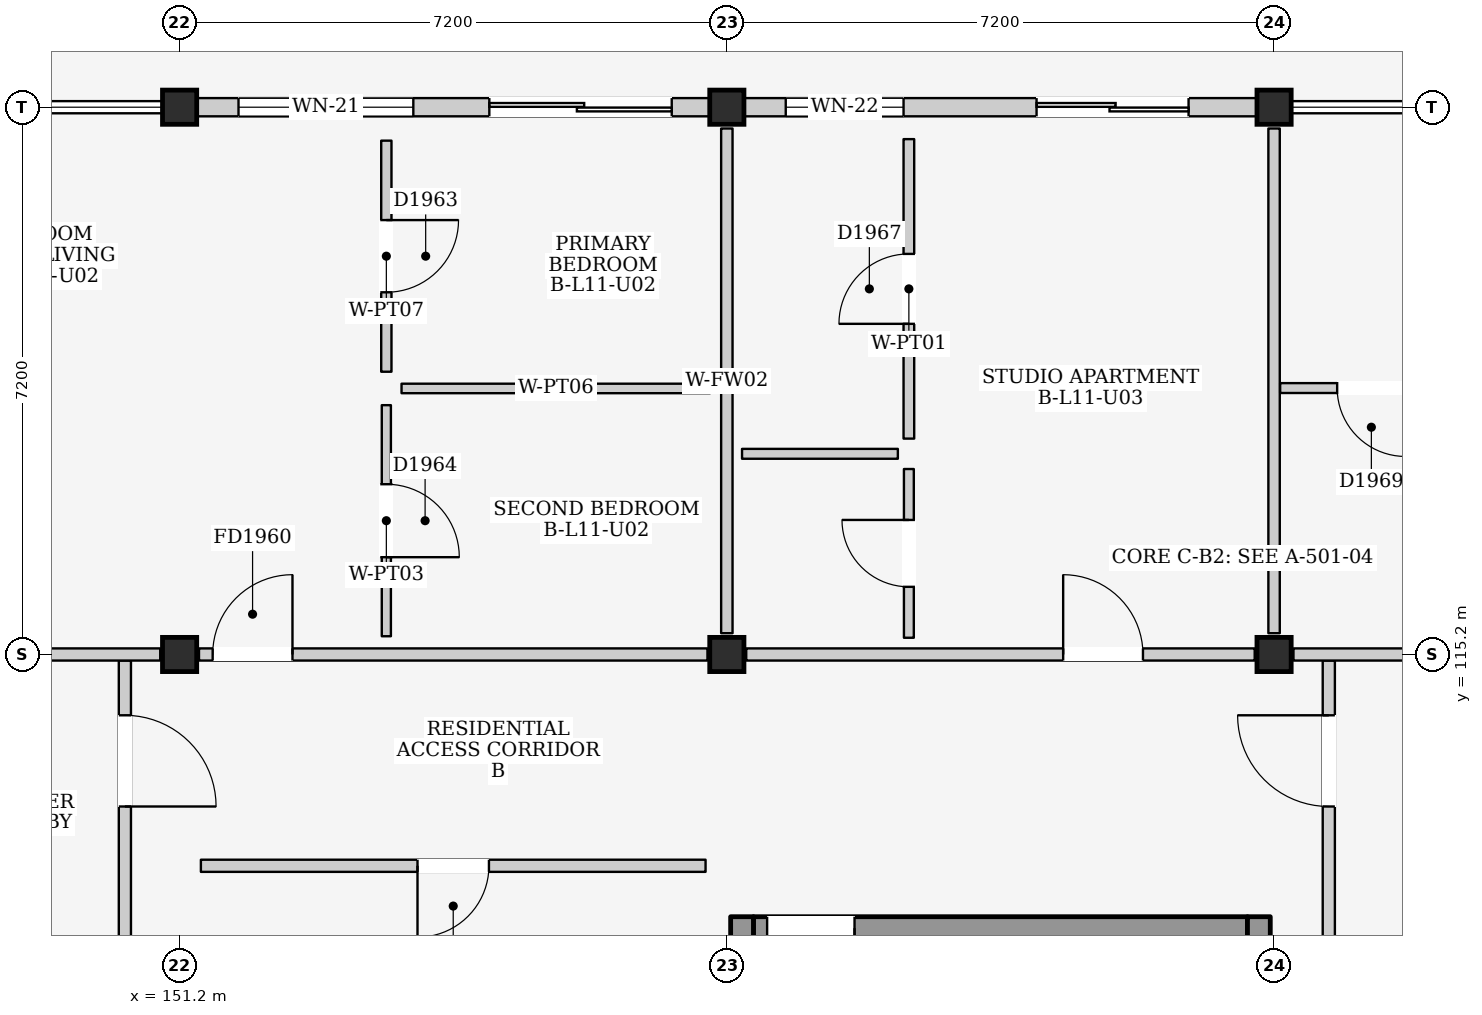
"""IFC4 building model, lengths in metres.
Left out: names, types, materials, properties, quantities, classifications, styles, units other than length and angle.
Written with IfcOpenShell. Run it as: python <this file> out.ifc"""

import sys

from ifc_helpers import new_model, si_unit, direction, frame, frame_2d, origin, origin_2d, place, context, subcontext, project, spatial, rectangle, extrude, element, fill, save


model = new_model("IFC4")
c1 = context("Model", 3, precision=1e-05, world=origin(), true_north=direction((0.0, 1.0)))
c2 = subcontext(c1, "Body", "Model", "MODEL_VIEW")
j1 = project(units=[si_unit("LENGTHUNIT", "METRE"), si_unit("PLANEANGLEUNIT", "RADIAN")], contexts=[c1])
p1 = place(None, origin())
s1 = spatial("IfcSite", under=j1, at=p1, CompositionType="ELEMENT")
p2 = place(p1, origin())
s2 = spatial("IfcBuilding", under=s1, at=p2, CompositionType="ELEMENT")
p3 = place(p2, frame((0.0, 0.0, 38.0)))
s3 = spatial("IfcBuildingStorey", under=s2, at=p3, CompositionType="ELEMENT", Elevation=38.0)
for number, where, z_axis, x_axis in (
    (1, (151.2, 115.2, 0.0), (0.0, 0.0, 1.0), (1.0, 0.0, 0.0)),
    (2, (151.2, 122.4, 0.0), (0.0, 0.0, 1.0), (1.0, 0.0, 0.0)),
    (3, (158.4, 115.2, 0.0), (0.0, 0.0, 1.0), (1.0, 0.0, 0.0)),
    (4, (158.4, 122.4, 0.0), (0.0, 0.0, 1.0), (1.0, 0.0, 0.0)),
    (5, (165.6, 115.2, 0.0), (0.0, 0.0, 1.0), (1.0, 0.0, 0.0)),
    (6, (165.6, 122.4, 0.0), (0.0, 0.0, 1.0), (1.0, 0.0, 0.0)),
):
    element("IfcColumn", number, at=place(p3, frame(where, z_axis=z_axis, x_axis=x_axis)), inside=s3, PredefinedType="COLUMN", context=c2, shape_type="SweptSolid", body=[
        extrude(rectangle(XDim=0.45, YDim=0.45, at=origin_2d()), origin(), (0.0, 0.0, 1.0), 3.2),
    ])
p4 = place(p3, frame((151.425, 122.4, 0.0), z_axis=(0.0, 0.0, 1.0), x_axis=(1.0, 0.0, 0.0)))
e7 = element("IfcWall", 7, at=p4, inside=s3, PredefinedType="ELEMENTEDWALL", context=c2, shape_type="SweptSolid", body=[
    extrude(rectangle(XDim=6.75, YDim=0.24, at=frame_2d((3.375, 0.0))), origin(), (0.0, 0.0, 1.0), 2.525),
])
p5 = place(p4, frame((3.85, 0.0, 0.0)))
e8 = element("IfcOpeningElement", 8, at=p5, cuts=e7, PredefinedType="OPENING", context=c2, shape_type="SweptSolid", body=[
    extrude(rectangle(XDim=2.4, YDim=2.12, at=frame_2d((1.2, 1.06))), frame((0.0, 0.135, 0.0), z_axis=(0.0, -1.0, 0.0), x_axis=(1.0, 0.0, 0.0)), (0.0, 0.0, 1.0), 0.27),
])
p6 = place(p4, frame((0.55, 0.0, 0.815)))
e9 = element("IfcOpeningElement", 9, at=p6, cuts=e7, PredefinedType="OPENING", context=c2, shape_type="SweptSolid", body=[
    extrude(rectangle(XDim=2.3, YDim=1.6, at=frame_2d((1.15, 0.8))), frame((0.0, 0.135, 0.0), z_axis=(0.0, -1.0, 0.0), x_axis=(1.0, 0.0, 0.0)), (0.0, 0.0, 1.0), 0.27),
])
p7 = place(p3, frame((158.625, 122.4, 0.0), z_axis=(0.0, 0.0, 1.0), x_axis=(1.0, 0.0, 0.0)))
e10 = element("IfcWall", 10, at=p7, inside=s3, PredefinedType="ELEMENTEDWALL", context=c2, shape_type="SweptSolid", body=[
    extrude(rectangle(XDim=6.75, YDim=0.24, at=frame_2d((3.375, 0.0))), origin(), (0.0, 0.0, 1.0), 2.525),
])
p8 = place(p7, frame((3.85, 0.0, 0.0)))
e11 = element("IfcOpeningElement", 11, at=p8, cuts=e10, PredefinedType="OPENING", context=c2, shape_type="SweptSolid", body=[
    extrude(rectangle(XDim=2.0, YDim=2.12, at=frame_2d((1.0, 1.06))), frame((0.0, 0.135, 0.0), z_axis=(0.0, -1.0, 0.0), x_axis=(1.0, 0.0, 0.0)), (0.0, 0.0, 1.0), 0.27),
])
p9 = place(p7, frame((0.55, 0.0, 0.9)))
e12 = element("IfcOpeningElement", 12, at=p9, cuts=e10, PredefinedType="OPENING", context=c2, shape_type="SweptSolid", body=[
    extrude(rectangle(XDim=1.55, YDim=1.45, at=frame_2d((0.775, 0.725))), frame((0.0, 0.135, 0.0), z_axis=(0.0, -1.0, 0.0), x_axis=(1.0, 0.0, 0.0)), (0.0, 0.0, 1.0), 0.27),
])
p10 = place(p3, frame((150.48, 111.1, 0.0), z_axis=(0.0, 0.0, 1.0), x_axis=(0.0, 1.0, 0.0)))
e13 = element("IfcWall", 13, at=p10, inside=s3, PredefinedType="PARTITIONING", context=c2, shape_type="SweptSolid", body=[
    extrude(rectangle(XDim=4.02, YDim=0.16, at=frame_2d((2.01, 0.0))), origin(), (0.0, 0.0, 1.0), 2.99),
])
p11 = place(p10, frame((2.1, 0.0, 0.0)))
e14 = element("IfcOpeningElement", 14, at=p11, cuts=e13, PredefinedType="OPENING", context=c2, shape_type="SweptSolid", body=[
    extrude(rectangle(XDim=1.2, YDim=2.2, at=frame_2d((0.6, 1.1))), frame((0.0, 0.095, 0.0), z_axis=(0.0, -1.0, 0.0), x_axis=(1.0, 0.0, 0.0)), (0.0, 0.0, 1.0), 0.19),
])
p12 = place(p3, frame((158.75, 111.6, 0.0), z_axis=(0.0, 0.0, 1.0), x_axis=(1.0, 0.0, 0.0)))
e15 = element("IfcWall", 15, at=p12, inside=s3, PredefinedType="SHEAR", context=c2, shape_type="SweptSolid", body=[
    extrude(rectangle(XDim=6.5, YDim=0.3, at=frame_2d((3.25, 0.0))), origin(), (0.0, 0.0, 1.0), 2.99),
])
p13 = place(p12, frame((0.18, 0.0, 0.0)))
e16 = element("IfcOpeningElement", 16, at=p13, cuts=e15, PredefinedType="OPENING", context=c2, shape_type="SweptSolid", body=[
    extrude(rectangle(XDim=1.15, YDim=2.2, at=frame_2d((0.575, 1.1))), frame((0.0, 0.165, 0.0), z_axis=(0.0, -1.0, 0.0), x_axis=(1.0, 0.0, 0.0)), (0.0, 0.0, 1.0), 0.33),
])
for number, where, z_axis, x_axis in (
    (17, (158.6, 108.15, 0.0), (0.0, 0.0, 1.0), (0.0, 1.0, 0.0)),
    (18, (165.4, 108.15, 0.0), (0.0, 0.0, 1.0), (0.0, 1.0, 0.0)),
):
    element("IfcWall", number, at=place(p3, frame(where, z_axis=z_axis, x_axis=x_axis)), inside=s3, PredefinedType="SHEAR", context=c2, shape_type="SweptSolid", body=[
        extrude(rectangle(XDim=3.6, YDim=0.3, at=frame_2d((1.8, 0.0))), origin(), (0.0, 0.0, 1.0), 2.99),
    ])
p14 = place(p3, frame((166.32, 110.8, 0.0), z_axis=(0.0, 0.0, 1.0), x_axis=(0.0, 1.0, 0.0)))
e19 = element("IfcWall", 19, at=p14, inside=s3, PredefinedType="PARTITIONING", context=c2, shape_type="SweptSolid", body=[
    extrude(rectangle(XDim=4.32, YDim=0.16, at=frame_2d((2.16, 0.0))), origin(), (0.0, 0.0, 1.0), 2.99),
])
p15 = place(p14, frame((2.4, 0.0, 0.0)))
e20 = element("IfcOpeningElement", 20, at=p15, cuts=e19, PredefinedType="OPENING", context=c2, shape_type="SweptSolid", body=[
    extrude(rectangle(XDim=1.2, YDim=2.2, at=frame_2d((0.6, 1.1))), frame((0.0, 0.095, 0.0), z_axis=(0.0, -1.0, 0.0), x_axis=(1.0, 0.0, 0.0)), (0.0, 0.0, 1.0), 0.19),
])
p16 = place(p3, frame((144.255, 115.2, 0.0), z_axis=(0.0, 0.0, 1.0), x_axis=(1.0, 0.0, 0.0)))
e21 = element("IfcWall", 21, at=p16, inside=s3, PredefinedType="PARTITIONING", context=c2, shape_type="SweptSolid", body=[
    extrude(rectangle(XDim=6.69, YDim=0.16, at=frame_2d((3.345, 0.0))), origin(), (0.0, 0.0, 1.0), 2.375),
])
p17 = place(p3, frame((151.455, 115.2, 0.0), z_axis=(0.0, 0.0, 1.0), x_axis=(1.0, 0.0, 0.0)))
e22 = element("IfcWall", 22, at=p17, inside=s3, PredefinedType="PARTITIONING", context=c2, shape_type="SweptSolid", body=[
    extrude(rectangle(XDim=6.69, YDim=0.16, at=frame_2d((3.345, 0.0))), origin(), (0.0, 0.0, 1.0), 2.375),
])
p18 = place(p17, frame((0.18, 0.0, 0.0)))
e23 = element("IfcOpeningElement", 23, at=p18, cuts=e22, PredefinedType="OPENING", context=c2, shape_type="SweptSolid", body=[
    extrude(rectangle(XDim=1.05, YDim=2.15, at=frame_2d((0.525, 1.075))), frame((0.0, 0.095, 0.0), z_axis=(0.0, -1.0, 0.0), x_axis=(1.0, 0.0, 0.0)), (0.0, 0.0, 1.0), 0.19),
])
p19 = place(p3, frame((158.4, 115.48, 0.0), z_axis=(0.0, 0.0, 1.0), x_axis=(0.0, 1.0, 0.0)))
e24 = element("IfcWall", 24, at=p19, inside=s3, PredefinedType="PARTITIONING", context=c2, shape_type="SweptSolid", body=[
    extrude(rectangle(XDim=6.64, YDim=0.15, at=frame_2d((3.32, 0.0))), origin(), (0.0, 0.0, 1.0), 2.475),
])
p20 = place(p3, frame((153.92, 118.92, 0.0), z_axis=(0.0, 0.0, 1.0), x_axis=(0.0, 1.0, 0.0)))
e25 = element("IfcWall", 25, at=p20, inside=s3, PredefinedType="PARTITIONING", context=c2, shape_type="SweptSolid", body=[
    extrude(rectangle(XDim=3.04, YDim=0.135, at=frame_2d((1.52, 0.0))), origin(), (0.0, 0.0, 1.0), 2.99),
])
p21 = place(p20, frame((1.045, 0.0, 0.0)))
e26 = element("IfcOpeningElement", 26, at=p21, cuts=e25, PredefinedType="OPENING", context=c2, shape_type="SweptSolid", body=[
    extrude(rectangle(XDim=0.95, YDim=2.15, at=frame_2d((0.475, 1.075))), frame((0.0, 0.083, 0.0), z_axis=(0.0, -1.0, 0.0), x_axis=(1.0, 0.0, 0.0)), (0.0, 0.0, 1.0), 0.165),
])
p22 = place(p3, frame((154.12, 118.7, 0.0), z_axis=(0.0, 0.0, 1.0), x_axis=(1.0, 0.0, 0.0)))
e27 = element("IfcWall", 27, at=p22, inside=s3, PredefinedType="PARTITIONING", context=c2, shape_type="SweptSolid", body=[
    extrude(rectangle(XDim=4.06, YDim=0.125, at=frame_2d((2.03, 0.0))), origin(), (0.0, 0.0, 1.0), 2.99),
])
p23 = place(p3, frame((153.92, 115.44, 0.0), z_axis=(0.0, 0.0, 1.0), x_axis=(0.0, 1.0, 0.0)))
e28 = element("IfcWall", 28, at=p23, inside=s3, PredefinedType="PARTITIONING", context=c2, shape_type="SweptSolid", body=[
    extrude(rectangle(XDim=3.04, YDim=0.12, at=frame_2d((1.52, 0.0))), origin(), (0.0, 0.0, 1.0), 2.99),
])
p24 = place(p23, frame((1.04, 0.0, 0.0)))
e29 = element("IfcOpeningElement", 29, at=p24, cuts=e28, PredefinedType="OPENING", context=c2, shape_type="SweptSolid", body=[
    extrude(rectangle(XDim=0.96, YDim=2.15, at=frame_2d((0.48, 1.075))), frame((0.0, 0.075, 0.0), z_axis=(0.0, -1.0, 0.0), x_axis=(1.0, 0.0, 0.0)), (0.0, 0.0, 1.0), 0.15),
])
p25 = place(p3, frame((158.655, 115.2, 0.0), z_axis=(0.0, 0.0, 1.0), x_axis=(1.0, 0.0, 0.0)))
e30 = element("IfcWall", 30, at=p25, inside=s3, PredefinedType="PARTITIONING", context=c2, shape_type="SweptSolid", body=[
    extrude(rectangle(XDim=6.69, YDim=0.16, at=frame_2d((3.345, 0.0))), origin(), (0.0, 0.0, 1.0), 2.375),
])
p26 = place(p25, frame((4.17, 0.0, 0.0)))
e31 = element("IfcOpeningElement", 31, at=p26, cuts=e30, PredefinedType="OPENING", context=c2, shape_type="SweptSolid", body=[
    extrude(rectangle(XDim=1.05, YDim=2.15, at=frame_2d((0.525, 1.075))), frame((0.0, 0.095, 0.0), z_axis=(0.0, -1.0, 0.0), x_axis=(1.0, 0.0, 0.0)), (0.0, 0.0, 1.0), 0.19),
])
p27 = place(p3, frame((165.6, 115.48, 0.0), z_axis=(0.0, 0.0, 1.0), x_axis=(0.0, 1.0, 0.0)))
e32 = element("IfcWall", 32, at=p27, inside=s3, PredefinedType="PARTITIONING", context=c2, shape_type="SweptSolid", body=[
    extrude(rectangle(XDim=6.64, YDim=0.15, at=frame_2d((3.32, 0.0))), origin(), (0.0, 0.0, 1.0), 2.475),
])
p28 = place(p3, frame((158.6, 117.84, 0.0), z_axis=(0.0, 0.0, 1.0), x_axis=(1.0, 0.0, 0.0)))
e33 = element("IfcWall", 33, at=p28, inside=s3, PredefinedType="PARTITIONING", context=c2, shape_type="SweptSolid", body=[
    extrude(rectangle(XDim=2.05, YDim=0.13, at=frame_2d((1.025, 0.0))), origin(), (0.0, 0.0, 1.0), 2.99),
])
p29 = place(p3, frame((160.795, 115.42, 0.0), z_axis=(0.0, 0.0, 1.0), x_axis=(0.0, 1.0, 0.0)))
e34 = element("IfcWall", 34, at=p29, inside=s3, PredefinedType="PARTITIONING", context=c2, shape_type="SweptSolid", body=[
    extrude(rectangle(XDim=2.22, YDim=0.13, at=frame_2d((1.11, 0.0))), origin(), (0.0, 0.0, 1.0), 2.99),
])
p30 = place(p29, frame((0.67, 0.0, 0.0)))
e35 = element("IfcOpeningElement", 35, at=p30, cuts=e34, PredefinedType="OPENING", context=c2, shape_type="SweptSolid", body=[
    extrude(rectangle(XDim=0.88, YDim=2.1, at=frame_2d((0.44, 1.05))), frame((0.0, 0.08, 0.0), z_axis=(0.0, -1.0, 0.0), x_axis=(1.0, 0.0, 0.0)), (0.0, 0.0, 1.0), 0.16),
])
p31 = place(p3, frame((160.795, 118.04, 0.0), z_axis=(0.0, 0.0, 1.0), x_axis=(0.0, 1.0, 0.0)))
e36 = element("IfcWall", 36, at=p31, inside=s3, PredefinedType="PARTITIONING", context=c2, shape_type="SweptSolid", body=[
    extrude(rectangle(XDim=3.94, YDim=0.14, at=frame_2d((1.97, 0.0))), origin(), (0.0, 0.0, 1.0), 2.99),
])
p32 = place(p31, frame((1.51, 0.0, 0.0)))
e37 = element("IfcOpeningElement", 37, at=p32, cuts=e36, PredefinedType="OPENING", context=c2, shape_type="SweptSolid", body=[
    extrude(rectangle(XDim=0.92, YDim=2.1, at=frame_2d((0.46, 1.05))), frame((0.0, 0.085, 0.0), z_axis=(0.0, -1.0, 0.0), x_axis=(1.0, 0.0, 0.0)), (0.0, 0.0, 1.0), 0.17),
])
p33 = place(p3, frame((165.855, 115.2, 0.0), z_axis=(0.0, 0.0, 1.0), x_axis=(1.0, 0.0, 0.0)))
e38 = element("IfcWall", 38, at=p33, inside=s3, PredefinedType="PARTITIONING", context=c2, shape_type="SweptSolid", body=[
    extrude(rectangle(XDim=6.69, YDim=0.16, at=frame_2d((3.345, 0.0))), origin(), (0.0, 0.0, 1.0), 2.375),
])
p34 = place(p3, frame((165.68, 118.705, 0.0), z_axis=(0.0, 0.0, 1.0), x_axis=(1.0, 0.0, 0.0)))
e39 = element("IfcWall", 39, at=p34, inside=s3, PredefinedType="PARTITIONING", context=c2, shape_type="SweptSolid", body=[
    extrude(rectangle(XDim=2.4, YDim=0.13, at=frame_2d((1.2, 0.0))), origin(), (0.0, 0.0, 1.0), 2.99),
])
p35 = place(p34, frame((0.75, 0.0, 0.0)))
e40 = element("IfcOpeningElement", 40, at=p35, cuts=e39, PredefinedType="OPENING", context=c2, shape_type="SweptSolid", body=[
    extrude(rectangle(XDim=0.9, YDim=2.1, at=frame_2d((0.45, 1.05))), frame((0.0, 0.08, 0.0), z_axis=(0.0, -1.0, 0.0), x_axis=(1.0, 0.0, 0.0)), (0.0, 0.0, 1.0), 0.16),
])
p36 = place(p3, frame((151.48, 112.42, 0.0), z_axis=(0.0, 0.0, 1.0), x_axis=(1.0, 0.0, 0.0)))
e41 = element("IfcWall", 41, at=p36, inside=s3, PredefinedType="PARTITIONING", context=c2, shape_type="SweptSolid", body=[
    extrude(rectangle(XDim=6.64, YDim=0.16, at=frame_2d((3.32, 0.0))), origin(), (0.0, 0.0, 1.0), 2.99),
])
p37 = place(p36, frame((2.85, 0.0, 0.0)))
e42 = element("IfcOpeningElement", 42, at=p37, cuts=e41, PredefinedType="OPENING", context=c2, shape_type="SweptSolid", body=[
    extrude(rectangle(XDim=0.94, YDim=2.12, at=frame_2d((0.47, 1.06))), frame((0.0, 0.095, 0.0), z_axis=(0.0, -1.0, 0.0), x_axis=(1.0, 0.0, 0.0)), (0.0, 0.0, 1.0), 0.19),
])
p38 = place(p5, frame((2.4, 0.0, 0.0), z_axis=(0.0, 0.0, 1.0), x_axis=(-1.0, 0.0, 0.0)))
e43 = element("IfcDoor", 43, at=p38, inside=s3, OperationType="DOUBLE_DOOR_SLIDING", PredefinedType="DOOR", context=c2, shape_type="SweptSolid", body=[
    extrude(rectangle(XDim=2.4, YDim=2.12, at=frame_2d((1.2, 1.06))), frame((0.0, 0.025, 0.0), z_axis=(0.0, -1.0, 0.0), x_axis=(1.0, 0.0, 0.0)), (0.0, 0.0, 1.0), 0.05),
])
fill(e8, e43)
p39 = place(p6, origin())
e44 = element("IfcWindow", 44, at=p39, inside=s3, PartitioningType="TRIPLE_PANEL_VERTICAL", PredefinedType="WINDOW", context=c2, shape_type="SweptSolid", body=[
    extrude(rectangle(XDim=2.3, YDim=1.6, at=frame_2d((1.15, 0.8))), frame((0.0, 0.03, 0.0), z_axis=(0.0, -1.0, 0.0), x_axis=(1.0, 0.0, 0.0)), (0.0, 0.0, 1.0), 0.06),
])
fill(e9, e44)
p40 = place(p8, frame((2.0, 0.0, 0.0), z_axis=(0.0, 0.0, 1.0), x_axis=(-1.0, 0.0, 0.0)))
e45 = element("IfcDoor", 45, at=p40, inside=s3, OperationType="DOUBLE_DOOR_SLIDING", PredefinedType="DOOR", context=c2, shape_type="SweptSolid", body=[
    extrude(rectangle(XDim=2.0, YDim=2.12, at=frame_2d((1.0, 1.06))), frame((0.0, 0.025, 0.0), z_axis=(0.0, -1.0, 0.0), x_axis=(1.0, 0.0, 0.0)), (0.0, 0.0, 1.0), 0.05),
])
fill(e11, e45)
p41 = place(p9, origin())
e46 = element("IfcWindow", 46, at=p41, inside=s3, PartitioningType="DOUBLE_PANEL_VERTICAL", PredefinedType="WINDOW", context=c2, shape_type="SweptSolid", body=[
    extrude(rectangle(XDim=1.55, YDim=1.45, at=frame_2d((0.775, 0.725))), frame((0.0, 0.03, 0.0), z_axis=(0.0, -1.0, 0.0), x_axis=(1.0, 0.0, 0.0)), (0.0, 0.0, 1.0), 0.06),
])
fill(e12, e46)
p42 = place(p11, frame((1.2, 0.0, 0.0), z_axis=(0.0, 0.0, 1.0), x_axis=(-1.0, 0.0, 0.0)))
e47 = element("IfcDoor", 47, at=p42, inside=s3, OperationType="SINGLE_SWING_RIGHT", PredefinedType="DOOR", context=c2, shape_type="SweptSolid", body=[
    extrude(rectangle(XDim=1.2, YDim=2.2, at=frame_2d((0.6, 1.1))), frame((0.0, 0.025, 0.0), z_axis=(0.0, -1.0, 0.0), x_axis=(1.0, 0.0, 0.0)), (0.0, 0.0, 1.0), 0.05),
])
fill(e14, e47)
p43 = place(p13, frame((1.15, 0.0, 0.0), z_axis=(0.0, 0.0, 1.0), x_axis=(-1.0, 0.0, 0.0)))
e48 = element("IfcDoor", 48, at=p43, inside=s3, OperationType="SINGLE_SWING_LEFT", PredefinedType="DOOR", context=c2, shape_type="SweptSolid", body=[
    extrude(rectangle(XDim=1.15, YDim=2.2, at=frame_2d((0.575, 1.1))), frame((0.0, 0.025, 0.0), z_axis=(0.0, -1.0, 0.0), x_axis=(1.0, 0.0, 0.0)), (0.0, 0.0, 1.0), 0.05),
])
fill(e16, e48)
p44 = place(p15, origin())
e49 = element("IfcDoor", 49, at=p44, inside=s3, OperationType="SINGLE_SWING_RIGHT", PredefinedType="DOOR", context=c2, shape_type="SweptSolid", body=[
    extrude(rectangle(XDim=1.2, YDim=2.2, at=frame_2d((0.6, 1.1))), frame((0.0, 0.025, 0.0), z_axis=(0.0, -1.0, 0.0), x_axis=(1.0, 0.0, 0.0)), (0.0, 0.0, 1.0), 0.05),
])
fill(e20, e49)
p45 = place(p18, origin())
e50 = element("IfcDoor", 50, at=p45, inside=s3, OperationType="SINGLE_SWING_RIGHT", PredefinedType="DOOR", context=c2, shape_type="SweptSolid", body=[
    extrude(rectangle(XDim=1.05, YDim=2.15, at=frame_2d((0.525, 1.075))), frame((0.0, 0.025, 0.0), z_axis=(0.0, -1.0, 0.0), x_axis=(1.0, 0.0, 0.0)), (0.0, 0.0, 1.0), 0.05),
])
fill(e23, e50)
p46 = place(p21, frame((0.95, 0.0, 0.0), z_axis=(0.0, 0.0, 1.0), x_axis=(-1.0, 0.0, 0.0)))
e51 = element("IfcDoor", 51, at=p46, inside=s3, OperationType="SINGLE_SWING_LEFT", PredefinedType="DOOR", context=c2, shape_type="SweptSolid", body=[
    extrude(rectangle(XDim=0.95, YDim=2.15, at=frame_2d((0.475, 1.075))), frame((0.0, 0.025, 0.0), z_axis=(0.0, -1.0, 0.0), x_axis=(1.0, 0.0, 0.0)), (0.0, 0.0, 1.0), 0.05),
])
fill(e26, e51)
p47 = place(p24, frame((0.96, 0.0, 0.0), z_axis=(0.0, 0.0, 1.0), x_axis=(-1.0, 0.0, 0.0)))
e52 = element("IfcDoor", 52, at=p47, inside=s3, OperationType="SINGLE_SWING_RIGHT", PredefinedType="DOOR", context=c2, shape_type="SweptSolid", body=[
    extrude(rectangle(XDim=0.96, YDim=2.15, at=frame_2d((0.48, 1.075))), frame((0.0, 0.025, 0.0), z_axis=(0.0, -1.0, 0.0), x_axis=(1.0, 0.0, 0.0)), (0.0, 0.0, 1.0), 0.05),
])
fill(e29, e52)
p48 = place(p26, origin())
e53 = element("IfcDoor", 53, at=p48, inside=s3, OperationType="SINGLE_SWING_LEFT", PredefinedType="DOOR", context=c2, shape_type="SweptSolid", body=[
    extrude(rectangle(XDim=1.05, YDim=2.15, at=frame_2d((0.525, 1.075))), frame((0.0, 0.025, 0.0), z_axis=(0.0, -1.0, 0.0), x_axis=(1.0, 0.0, 0.0)), (0.0, 0.0, 1.0), 0.05),
])
fill(e31, e53)
p49 = place(p30, origin())
e54 = element("IfcDoor", 54, at=p49, inside=s3, OperationType="SINGLE_SWING_RIGHT", PredefinedType="DOOR", context=c2, shape_type="SweptSolid", body=[
    extrude(rectangle(XDim=0.88, YDim=2.1, at=frame_2d((0.44, 1.05))), frame((0.0, 0.025, 0.0), z_axis=(0.0, -1.0, 0.0), x_axis=(1.0, 0.0, 0.0)), (0.0, 0.0, 1.0), 0.05),
])
fill(e35, e54)
p50 = place(p32, origin())
e55 = element("IfcDoor", 55, at=p50, inside=s3, OperationType="SINGLE_SWING_LEFT", PredefinedType="DOOR", context=c2, shape_type="SweptSolid", body=[
    extrude(rectangle(XDim=0.92, YDim=2.1, at=frame_2d((0.46, 1.05))), frame((0.0, 0.025, 0.0), z_axis=(0.0, -1.0, 0.0), x_axis=(1.0, 0.0, 0.0)), (0.0, 0.0, 1.0), 0.05),
])
fill(e37, e55)
p51 = place(p35, frame((0.9, 0.0, 0.0), z_axis=(0.0, 0.0, 1.0), x_axis=(-1.0, 0.0, 0.0)))
e56 = element("IfcDoor", 56, at=p51, inside=s3, OperationType="SINGLE_SWING_LEFT", PredefinedType="DOOR", context=c2, shape_type="SweptSolid", body=[
    extrude(rectangle(XDim=0.9, YDim=2.1, at=frame_2d((0.45, 1.05))), frame((0.0, 0.025, 0.0), z_axis=(0.0, -1.0, 0.0), x_axis=(1.0, 0.0, 0.0)), (0.0, 0.0, 1.0), 0.05),
])
fill(e40, e56)
p52 = place(p37, frame((0.94, 0.0, 0.0), z_axis=(0.0, 0.0, 1.0), x_axis=(-1.0, 0.0, 0.0)))
e57 = element("IfcDoor", 57, at=p52, inside=s3, OperationType="SINGLE_SWING_RIGHT", PredefinedType="DOOR", context=c2, shape_type="SweptSolid", body=[
    extrude(rectangle(XDim=0.94, YDim=2.12, at=frame_2d((0.47, 1.06))), frame((0.0, 0.025, 0.0), z_axis=(0.0, -1.0, 0.0), x_axis=(1.0, 0.0, 0.0)), (0.0, 0.0, 1.0), 0.05),
])
fill(e42, e57)
save(model, sys.argv[1])
